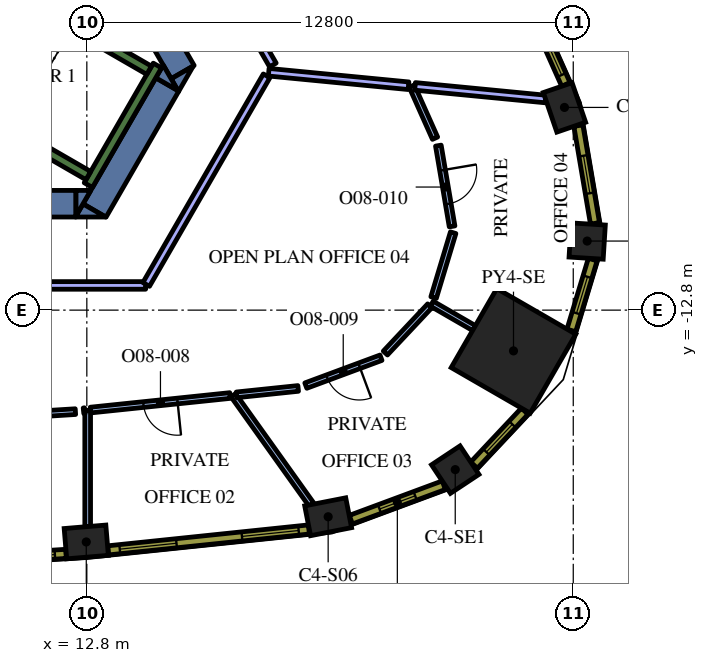
"""IFC4 building model, lengths in metres.
Left out: names, types, materials, properties, quantities, classifications, styles, units other than length and angle.
Written with IfcOpenShell. Run it as: python <this file> out.ifc"""

import sys

from ifc_helpers import new_model, si_unit, direction, frame, frame_2d, origin, origin_2d, place, context, subcontext, project, spatial, polyline, rectangle, outline, extrude, element, fill, save


model = new_model("IFC4")
c1 = context("Model", 3, precision=1e-05, world=origin(), true_north=direction((0.0, 1.0)))
c2 = subcontext(c1, "Body", "Model", "MODEL_VIEW")
j1 = project(units=[si_unit("LENGTHUNIT", "METRE"), si_unit("PLANEANGLEUNIT", "RADIAN")], contexts=[c1])
p1 = place(None, origin())
s1 = spatial("IfcSite", under=j1, at=p1, CompositionType="ELEMENT")
p2 = place(p1, origin())
s2 = spatial("IfcBuilding", under=s1, at=p2, CompositionType="ELEMENT")
p3 = place(p2, frame((0.0, 0.0, 235.2)))
s3 = spatial("IfcBuildingStorey", under=s2, at=p3, CompositionType="ELEMENT", Elevation=235.2)
p4 = place(p3, frame((24.027, -13.872, 0.0), z_axis=(0.0, 0.0, 1.0), x_axis=(0.866025403784, -0.5, 0.0)))
e1 = element("IfcColumn", 1, at=p4, inside=s3, PredefinedType="COLUMN", context=c2, shape_type="SweptSolid", body=[
    extrude(rectangle(XDim=2.4, YDim=2.4, at=origin_2d()), origin(), (0.0, 0.0, 1.0), 4.2),
])
for number, where, z_axis, x_axis in (
    (2, (12.785, -18.9, 0.0), (0.0, 0.0, 1.0), (0.997, 0.083, 0.0)),
    (3, (19.15, -18.237, 0.0), (0.0, 0.0, 1.0), (0.981, 0.192, 0.0)),
):
    element("IfcColumn", number, at=place(p3, frame(where, z_axis=z_axis, x_axis=x_axis)), inside=s3, PredefinedType="COLUMN", context=c2, shape_type="SweptSolid", body=[
        extrude(rectangle(XDim=1.1, YDim=0.8, at=origin_2d()), origin(), (0.0, 0.0, 1.0), 4.2),
    ])
for number, where, z_axis, x_axis in (
    (4, (22.494, -16.997, 0.0), (0.0, 0.0, 1.0), (0.833, 0.553, 0.0)),
    (5, (25.967, -10.982, 0.0), (0.0, 0.0, 1.0), (0.062, 0.998, 0.0)),
):
    element("IfcColumn", number, at=place(p3, frame(where, z_axis=z_axis, x_axis=x_axis)), inside=s3, PredefinedType="COLUMN", context=c2, shape_type="SweptSolid", body=[
        extrude(rectangle(XDim=0.9, YDim=0.9, at=origin_2d()), origin(), (0.0, 0.0, 1.0), 4.2),
    ])
p5 = place(p3, frame((25.369, -7.466, 0.0), z_axis=(0.0, 0.0, 1.0), x_axis=(-0.324074280638, 0.946031638281, 0.0)))
e6 = element("IfcColumn", 6, at=p5, inside=s3, PredefinedType="COLUMN", context=c2, shape_type="SweptSolid", body=[
    extrude(rectangle(XDim=1.1, YDim=0.8, at=origin_2d()), origin(), (0.0, 0.0, 1.0), 4.2),
])
p6 = place(p3, frame((9.085, 4.264, 0.0), z_axis=(0.0, 0.0, 1.0), x_axis=(0.499998082512, -0.866026510844, 0.0)))
e7 = element("IfcWall", 7, at=p6, inside=s3, PredefinedType="SOLIDWALL", context=c2, shape_type="SweptSolid", body=[
    extrude(rectangle(XDim=12.472, YDim=0.7, at=frame_2d((6.236, 0.0))), origin(), (0.0, 0.0, 1.0), 4.2),
])
p7 = place(p3, origin())
e8 = element("IfcWall", 8, at=p7, inside=s3, PredefinedType="SOLIDWALL", context=c2, shape_type="SweptSolid", body=[
    extrude(outline(polyline([(15.213, -7.05), (15.019, -6.714), (15.601, -6.378), (15.213, -7.05)])), origin(), (0.0, 0.0, 1.0), 4.2),
])
p8 = place(p3, frame((13.003, -10.179, 0.0), z_axis=(0.0, 0.0, 1.0), x_axis=(0.499972675833, 0.866041178825, 0.0)))
e9 = element("IfcWall", 9, at=p8, inside=s3, PredefinedType="SOLIDWALL", context=c2, shape_type="SweptSolid", body=[
    extrude(rectangle(XDim=3.829, YDim=0.7, at=frame_2d((1.915, 0.0))), origin(), (0.0, 0.0, 1.0), 4.2),
])
e10 = element("IfcWall", 10, at=p7, inside=s3, PredefinedType="SOLIDWALL", context=c2, shape_type="SweptSolid", body=[
    extrude(outline(polyline([(12.5, -10.35), (12.698, -10.005), (13.296, -10.35), (12.5, -10.35)])), origin(), (0.0, 0.0, 1.0), 4.2),
])
e11 = element("IfcWall", 11, at=p7, inside=s3, PredefinedType="SOLIDWALL", context=c2, shape_type="SweptSolid", body=[
    extrude(outline(polyline([(14.809, -6.35), (15.197, -7.022), (14.615, -6.686), (14.809, -6.35)])), origin(), (0.0, 0.0, 1.0), 4.2),
])
p9 = place(p3, frame((10.604, -10.0, 0.0), z_axis=(0.0, 0.0, 1.0), x_axis=(1.0, 0.0, 0.0)))
e12 = element("IfcWall", 12, at=p9, inside=s3, PredefinedType="SOLIDWALL", context=c2, shape_type="SweptSolid", body=[
    extrude(rectangle(XDim=1.909, YDim=0.7, at=frame_2d((0.955, 0.0))), origin(), (0.0, 0.0, 1.0), 4.2),
])
e13 = element("IfcWall", 13, at=p7, inside=s3, PredefinedType="SOLIDWALL", context=c2, shape_type="SweptSolid", body=[
    extrude(outline(polyline([(12.904, -9.65), (12.516, -10.322), (12.516, -9.65), (12.904, -9.65)])), origin(), (0.0, 0.0, 1.0), 4.2),
])
p10 = place(p3, frame((12.84, -9.511, 0.0), z_axis=(0.0, 0.0, 1.0), x_axis=(0.500048121057, 0.865997619297, 0.0)))
e14 = element("IfcWall", 14, at=p10, inside=s3, PredefinedType="SOLIDWALL", context=c2, shape_type="SweptSolid", body=[
    extrude(rectangle(XDim=3.634, YDim=0.25, at=frame_2d((1.817, 0.0))), origin(), (0.0, 0.0, 1.0), 4.2),
])
p11 = place(p3, frame((12.84, -9.261, 0.0), z_axis=(0.0, 0.0, 1.0), x_axis=(-0.866013990052, 0.500019768644, 0.0)))
e15 = element("IfcWall", 15, at=p11, inside=s3, PredefinedType="SOLIDWALL", context=c2, shape_type="SweptSolid", body=[
    extrude(rectangle(XDim=6.8, YDim=0.25, at=frame_2d((3.4, 0.0))), origin(), (0.0, 0.0, 1.0), 4.2),
])
p12 = place(p3, frame((8.334, -2.964, 0.0), z_axis=(0.0, 0.0, 1.0), x_axis=(0.866016039709, -0.500016218704, 0.0)))
e16 = element("IfcWall", 16, at=p12, inside=s3, PredefinedType="SOLIDWALL", context=c2, shape_type="SweptSolid", body=[
    extrude(rectangle(XDim=7.05, YDim=0.25, at=frame_2d((3.525, 0.0))), origin(), (0.0, 0.0, 1.0), 4.2),
])
p13 = place(p3, frame((12.823, -15.437, 0.0), z_axis=(0.0, 0.0, 1.0), x_axis=(0.0, -1.0, 0.0)))
e17 = element("IfcWall", 17, at=p13, inside=s3, PredefinedType="PARTITIONING", context=c2, shape_type="SweptSolid", body=[
    extrude(rectangle(XDim=3.058, YDim=0.15, at=frame_2d((1.529, 0.0))), origin(), (0.0, 0.0, 1.0), 3.45),
])
p14 = place(p3, frame((12.5, -15.471, 0.0), z_axis=(0.0, 0.0, 1.0), x_axis=(-0.998061916726, -0.0622286942, 0.0)))
e18 = element("IfcWall", 18, at=p14, inside=s3, PredefinedType="PARTITIONING", context=c2, shape_type="SweptSolid", body=[
    extrude(rectangle(XDim=5.995, YDim=0.15, at=frame_2d((2.998, 0.0))), origin(), (0.0, 0.0, 1.0), 3.45),
])
p15 = place(p14, frame((2.595, 0.0, 0.0)))
e19 = element("IfcOpeningElement", 19, at=p15, cuts=e18, PredefinedType="OPENING", context=c2, shape_type="SweptSolid", body=[
    extrude(rectangle(XDim=0.9, YDim=2.1, at=frame_2d((0.45, 1.05))), frame((0.0, 0.085, 0.0), z_axis=(0.0, -1.0, 0.0), x_axis=(1.0, 0.0, 0.0)), (0.0, 0.0, 1.0), 0.17),
])
p16 = place(p3, frame((12.713, -15.448, 0.0), z_axis=(0.0, 0.0, 1.0), x_axis=(0.995106821048, 0.098804932586, 0.0)))
e20 = element("IfcWall", 20, at=p16, inside=s3, PredefinedType="PARTITIONING", context=c2, shape_type="SweptSolid", body=[
    extrude(rectangle(XDim=0.035, YDim=0.15, at=frame_2d((0.017, 0.0))), origin(), (0.0, 0.0, 1.0), 3.45),
])
p17 = place(p3, frame((16.655, -15.038, 0.0), z_axis=(0.0, 0.0, 1.0), x_axis=(0.580996489012, -0.813906063226, 0.0)))
e21 = element("IfcWall", 21, at=p17, inside=s3, PredefinedType="PARTITIONING", context=c2, shape_type="SweptSolid", body=[
    extrude(rectangle(XDim=3.536, YDim=0.15, at=frame_2d((1.768, 0.0))), origin(), (0.0, 0.0, 1.0), 3.45),
])
p18 = place(p3, frame((16.569, -15.047, 0.0), z_axis=(0.0, 0.0, 1.0), x_axis=(-0.994621532294, -0.103576095197, 0.0)))
e22 = element("IfcWall", 22, at=p18, inside=s3, PredefinedType="PARTITIONING", context=c2, shape_type="SweptSolid", body=[
    extrude(rectangle(XDim=3.691, YDim=0.15, at=frame_2d((1.846, 0.0))), origin(), (0.0, 0.0, 1.0), 3.45),
])
p19 = place(p18, frame((1.391, 0.0, 0.0)))
e23 = element("IfcOpeningElement", 23, at=p19, cuts=e22, PredefinedType="OPENING", context=c2, shape_type="SweptSolid", body=[
    extrude(rectangle(XDim=0.9, YDim=2.1, at=frame_2d((0.45, 1.05))), frame((0.0, 0.085, 0.0), z_axis=(0.0, -1.0, 0.0), x_axis=(1.0, 0.0, 0.0)), (0.0, 0.0, 1.0), 0.17),
])
p20 = place(p3, frame((21.877, -12.63, 0.0), z_axis=(0.0, 0.0, 1.0), x_axis=(0.86599869919, -0.500046250861, 0.0)))
e24 = element("IfcWall", 24, at=p20, inside=s3, PredefinedType="PARTITIONING", context=c2, shape_type="SweptSolid", body=[
    extrude(rectangle(XDim=1.284, YDim=0.15, at=frame_2d((0.642, 0.0))), origin(), (0.0, 0.0, 1.0), 3.45),
])
p21 = place(p3, frame((16.74, -15.029, 0.0), z_axis=(0.0, 0.0, 1.0), x_axis=(0.994614871477, 0.103640037805, 0.0)))
e25 = element("IfcWall", 25, at=p21, inside=s3, PredefinedType="PARTITIONING", context=c2, shape_type="SweptSolid", body=[
    extrude(rectangle(XDim=1.63, YDim=0.15, at=frame_2d((0.815, 0.0))), origin(), (0.0, 0.0, 1.0), 3.45),
])
p22 = place(p3, frame((20.541, -14.052, 0.0), z_axis=(0.0, 0.0, 1.0), x_axis=(-0.937602119917, -0.347710029662, 0.0)))
e26 = element("IfcWall", 26, at=p22, inside=s3, PredefinedType="PARTITIONING", context=c2, shape_type="SweptSolid", body=[
    extrude(rectangle(XDim=2.11, YDim=0.15, at=frame_2d((1.055, 0.0))), origin(), (0.0, 0.0, 1.0), 3.45),
])
p23 = place(p22, frame((0.61, 0.0, 0.0)))
e27 = element("IfcOpeningElement", 27, at=p23, cuts=e26, PredefinedType="OPENING", context=c2, shape_type="SweptSolid", body=[
    extrude(rectangle(XDim=0.9, YDim=2.1, at=frame_2d((0.45, 1.05))), frame((0.0, 0.085, 0.0), z_axis=(0.0, -1.0, 0.0), x_axis=(1.0, 0.0, 0.0)), (0.0, 0.0, 1.0), 0.17),
])
p24 = place(p3, frame((20.656, -13.929, 0.0), z_axis=(0.0, 0.0, 1.0), x_axis=(0.684716940988, 0.728809104447, 0.0)))
e28 = element("IfcWall", 28, at=p24, inside=s3, PredefinedType="PARTITIONING", context=c2, shape_type="SweptSolid", body=[
    extrude(rectangle(XDim=1.705, YDim=0.15, at=frame_2d((0.853, 0.0))), origin(), (0.0, 0.0, 1.0), 3.45),
])
p25 = place(p3, frame((21.925, -12.469, 0.0), z_axis=(0.0, 0.0, 1.0), x_axis=(0.288767705809, 0.957399191603, 0.0)))
e29 = element("IfcWall", 29, at=p25, inside=s3, PredefinedType="PARTITIONING", context=c2, shape_type="SweptSolid", body=[
    extrude(rectangle(XDim=1.782, YDim=0.15, at=frame_2d((0.891, 0.0))), origin(), (0.0, 0.0, 1.0), 3.45),
])
p26 = place(p3, frame((22.05, -8.471, 0.0), z_axis=(0.0, 0.0, 1.0), x_axis=(0.167612004459, -0.985853039738, 0.0)))
e30 = element("IfcWall", 30, at=p26, inside=s3, PredefinedType="PARTITIONING", context=c2, shape_type="SweptSolid", body=[
    extrude(rectangle(XDim=2.156, YDim=0.15, at=frame_2d((1.078, 0.0))), origin(), (0.0, 0.0, 1.0), 3.45),
])
p27 = place(p26, frame((0.656, 0.0, 0.0)))
e31 = element("IfcOpeningElement", 31, at=p27, cuts=e30, PredefinedType="OPENING", context=c2, shape_type="SweptSolid", body=[
    extrude(rectangle(XDim=0.9, YDim=2.1, at=frame_2d((0.45, 1.05))), frame((0.0, 0.085, 0.0), z_axis=(0.0, -1.0, 0.0), x_axis=(1.0, 0.0, 0.0)), (0.0, 0.0, 1.0), 0.17),
])
p28 = place(p3, frame((21.963, -8.276, 0.0), z_axis=(0.0, 0.0, 1.0), x_axis=(-0.407510458183, 0.913200540118, 0.0)))
e32 = element("IfcWall", 32, at=p28, inside=s3, PredefinedType="PARTITIONING", context=c2, shape_type="SweptSolid", body=[
    extrude(rectangle(XDim=1.502, YDim=0.15, at=frame_2d((0.751, 0.0))), origin(), (0.0, 0.0, 1.0), 3.45),
])
p29 = place(p3, frame((21.437, -6.913, 0.0), z_axis=(0.0, 0.0, 1.0), x_axis=(0.995357015301, -0.096251816042, 0.0)))
e33 = element("IfcWall", 33, at=p29, inside=s3, PredefinedType="PARTITIONING", context=c2, shape_type="SweptSolid", body=[
    extrude(rectangle(XDim=3.45, YDim=0.2, at=frame_2d((1.725, 0.0))), origin(), (0.0, 0.0, 1.0), 3.45),
])
p30 = place(p3, frame((17.586, -6.54, 0.0), z_axis=(0.0, 0.0, 1.0), x_axis=(0.995358181524, -0.096239755158, 0.0)))
e34 = element("IfcWall", 34, at=p30, inside=s3, PredefinedType="PARTITIONING", context=c2, shape_type="SweptSolid", body=[
    extrude(rectangle(XDim=3.696, YDim=0.2, at=frame_2d((1.848, 0.0))), origin(), (0.0, 0.0, 1.0), 3.45),
])
p31 = place(p3, frame((6.517, -12.15, 0.0), z_axis=(0.0, 0.0, 1.0), x_axis=(1.0, 0.0, 0.0)))
e35 = element("IfcWall", 35, at=p31, inside=s3, PredefinedType="PARTITIONING", context=c2, shape_type="SweptSolid", body=[
    extrude(rectangle(XDim=7.83, YDim=0.2, at=frame_2d((3.915, 0.0))), origin(), (0.0, 0.0, 1.0), 3.45),
])
p32 = place(p31, frame((3.4, 0.0, 0.0)))
e36 = element("IfcOpeningElement", 36, at=p32, cuts=e35, PredefinedType="OPENING", context=c2, shape_type="SweptSolid", body=[
    extrude(rectangle(XDim=1.0, YDim=2.1, at=frame_2d((0.5, 1.05))), frame((0.0, 0.11, 0.0), z_axis=(0.0, -1.0, 0.0), x_axis=(1.0, 0.0, 0.0)), (0.0, 0.0, 1.0), 0.22),
])
p33 = place(p3, frame((14.362, -12.124, 0.0), z_axis=(0.0, 0.0, 1.0), x_axis=(0.500017005442, 0.866015585465, 0.0)))
e37 = element("IfcWall", 37, at=p33, inside=s3, PredefinedType="PARTITIONING", context=c2, shape_type="SweptSolid", body=[
    extrude(rectangle(XDim=6.338, YDim=0.2, at=frame_2d((3.169, 0.0))), origin(), (0.0, 0.0, 1.0), 3.45),
])
p34 = place(p3, frame((17.696, -6.35, 0.0), z_axis=(0.0, 0.0, 1.0), x_axis=(-0.499976825411, 0.866038783226, 0.0)))
e38 = element("IfcWall", 38, at=p34, inside=s3, PredefinedType="PARTITIONING", context=c2, shape_type="SweptSolid", body=[
    extrude(rectangle(XDim=4.653, YDim=0.2, at=frame_2d((2.326, 0.0))), origin(), (0.0, 0.0, 1.0), 3.45),
])
p35 = place(p3, frame((6.965, -19.543, 0.0), z_axis=(0.0, 0.0, 1.0), x_axis=(0.9980633213, 0.062206162685, 0.0)))
e39 = element("IfcWall", 39, at=p35, inside=s3, PredefinedType="SOLIDWALL", context=c2, shape_type="SweptSolid", body=[
    extrude(rectangle(XDim=5.298, YDim=0.24, at=frame_2d((2.649, 0.0))), origin(), (0.0, 0.0, 1.0), 3.95),
])
p36 = place(p35, frame((0.295, 0.0, 0.9)))
e40 = element("IfcOpeningElement", 40, at=p36, cuts=e39, PredefinedType="OPENING", context=c2, shape_type="SweptSolid", body=[
    extrude(rectangle(XDim=1.5, YDim=2.55, at=frame_2d((0.75, 1.275))), frame((0.0, 0.13, 0.0), z_axis=(0.0, -1.0, 0.0), x_axis=(1.0, 0.0, 0.0)), (0.0, 0.0, 1.0), 0.26),
])
p37 = place(p35, frame((3.504, 0.0, 0.9)))
e41 = element("IfcOpeningElement", 41, at=p37, cuts=e39, PredefinedType="OPENING", context=c2, shape_type="SweptSolid", body=[
    extrude(rectangle(XDim=1.5, YDim=2.55, at=frame_2d((0.75, 1.275))), frame((0.0, 0.13, 0.0), z_axis=(0.0, -1.0, 0.0), x_axis=(1.0, 0.0, 0.0)), (0.0, 0.0, 1.0), 0.26),
])
p38 = place(p3, frame((13.362, -19.121, 0.0), z_axis=(0.0, 0.0, 1.0), x_axis=(0.994621961215, 0.103571976272, 0.0)))
e42 = element("IfcWall", 42, at=p38, inside=s3, PredefinedType="SOLIDWALL", context=c2, shape_type="SweptSolid", body=[
    extrude(rectangle(XDim=5.311, YDim=0.24, at=frame_2d((2.655, 0.0))), origin(), (0.0, 0.0, 1.0), 3.95),
])
p39 = place(p38, frame((0.306, 0.0, 0.9)))
e43 = element("IfcOpeningElement", 43, at=p39, cuts=e42, PredefinedType="OPENING", context=c2, shape_type="SweptSolid", body=[
    extrude(rectangle(XDim=1.5, YDim=2.55, at=frame_2d((0.75, 1.275))), frame((0.0, 0.13, 0.0), z_axis=(0.0, -1.0, 0.0), x_axis=(1.0, 0.0, 0.0)), (0.0, 0.0, 1.0), 0.26),
])
p40 = place(p38, frame((3.539, 0.0, 0.9)))
e44 = element("IfcOpeningElement", 44, at=p40, cuts=e42, PredefinedType="OPENING", context=c2, shape_type="SweptSolid", body=[
    extrude(rectangle(XDim=1.5, YDim=2.55, at=frame_2d((0.75, 1.275))), frame((0.0, 0.13, 0.0), z_axis=(0.0, -1.0, 0.0), x_axis=(1.0, 0.0, 0.0)), (0.0, 0.0, 1.0), 0.26),
])
p41 = place(p3, frame((19.748, -18.314, 0.0), z_axis=(0.0, 0.0, 1.0), x_axis=(0.937569171184, 0.347798863203, 0.0)))
e45 = element("IfcWall", 45, at=p41, inside=s3, PredefinedType="SOLIDWALL", context=c2, shape_type="SweptSolid", body=[
    extrude(rectangle(XDim=2.609, YDim=0.24, at=frame_2d((1.305, 0.0))), origin(), (0.0, 0.0, 1.0), 3.95),
])
p42 = place(p41, frame((0.805, 0.0, 0.9)))
e46 = element("IfcOpeningElement", 46, at=p42, cuts=e45, PredefinedType="OPENING", context=c2, shape_type="SweptSolid", body=[
    extrude(rectangle(XDim=1.0, YDim=2.55, at=frame_2d((0.5, 1.275))), frame((0.0, 0.13, 0.0), z_axis=(0.0, -1.0, 0.0), x_axis=(1.0, 0.0, 0.0)), (0.0, 0.0, 1.0), 0.26),
])
p43 = place(p3, frame((22.989, -16.879, 0.0), z_axis=(0.0, 0.0, 1.0), x_axis=(0.684770274166, 0.728758994194, 0.0)))
e47 = element("IfcWall", 47, at=p43, inside=s3, PredefinedType="SOLIDWALL", context=c2, shape_type="SweptSolid", body=[
    extrude(rectangle(XDim=1.948, YDim=0.24, at=frame_2d((0.974, 0.0))), origin(), (0.0, 0.0, 1.0), 3.95),
])
p44 = place(p43, frame((0.474, 0.0, 0.9)))
e48 = element("IfcOpeningElement", 48, at=p44, cuts=e47, PredefinedType="OPENING", context=c2, shape_type="SweptSolid", body=[
    extrude(rectangle(XDim=1.0, YDim=2.55, at=frame_2d((0.5, 1.275))), frame((0.0, 0.13, 0.0), z_axis=(0.0, -1.0, 0.0), x_axis=(1.0, 0.0, 0.0)), (0.0, 0.0, 1.0), 0.26),
])
p45 = place(p3, frame((25.55, -13.335, 0.0), z_axis=(0.0, 0.0, 1.0), x_axis=(0.288727209095, 0.957411405159, 0.0)))
e49 = element("IfcWall", 49, at=p45, inside=s3, PredefinedType="SOLIDWALL", context=c2, shape_type="SweptSolid", body=[
    extrude(rectangle(XDim=1.948, YDim=0.24, at=frame_2d((0.974, 0.0))), origin(), (0.0, 0.0, 1.0), 3.95),
])
p46 = place(p45, frame((0.474, 0.0, 0.9)))
e50 = element("IfcOpeningElement", 50, at=p46, cuts=e49, PredefinedType="OPENING", context=c2, shape_type="SweptSolid", body=[
    extrude(rectangle(XDim=1.0, YDim=2.55, at=frame_2d((0.5, 1.275))), frame((0.0, 0.13, 0.0), z_axis=(0.0, -1.0, 0.0), x_axis=(1.0, 0.0, 0.0)), (0.0, 0.0, 1.0), 0.26),
])
p47 = place(p3, frame((26.172, -10.517, 0.0), z_axis=(0.0, 0.0, 1.0), x_axis=(-0.167660055546, 0.985844869021, 0.0)))
e51 = element("IfcWall", 51, at=p47, inside=s3, PredefinedType="SOLIDWALL", context=c2, shape_type="SweptSolid", body=[
    extrude(rectangle(XDim=2.609, YDim=0.24, at=frame_2d((1.305, 0.0))), origin(), (0.0, 0.0, 1.0), 3.95),
])
p48 = place(p47, frame((0.805, 0.0, 0.9)))
e52 = element("IfcOpeningElement", 52, at=p48, cuts=e51, PredefinedType="OPENING", context=c2, shape_type="SweptSolid", body=[
    extrude(rectangle(XDim=1.0, YDim=2.55, at=frame_2d((0.5, 1.275))), frame((0.0, 0.13, 0.0), z_axis=(0.0, -1.0, 0.0), x_axis=(1.0, 0.0, 0.0)), (0.0, 0.0, 1.0), 0.26),
])
p49 = place(p3, frame((25.405, -6.861, 0.0), z_axis=(0.0, 0.0, 1.0), x_axis=(-0.407579651789, 0.913169659728, 0.0)))
e53 = element("IfcWall", 53, at=p49, inside=s3, PredefinedType="SOLIDWALL", context=c2, shape_type="SweptSolid", body=[
    extrude(rectangle(XDim=5.311, YDim=0.24, at=frame_2d((2.655, 0.0))), origin(), (0.0, 0.0, 1.0), 3.95),
])
p50 = place(p49, frame((0.271, 0.0, 0.9)))
e54 = element("IfcOpeningElement", 54, at=p50, cuts=e53, PredefinedType="OPENING", context=c2, shape_type="SweptSolid", body=[
    extrude(rectangle(XDim=1.5, YDim=2.55, at=frame_2d((0.75, 1.275))), frame((0.0, 0.13, 0.0), z_axis=(0.0, -1.0, 0.0), x_axis=(1.0, 0.0, 0.0)), (0.0, 0.0, 1.0), 0.26),
])
p51 = place(p49, frame((3.504, 0.0, 0.9)))
e55 = element("IfcOpeningElement", 55, at=p51, cuts=e53, PredefinedType="OPENING", context=c2, shape_type="SweptSolid", body=[
    extrude(rectangle(XDim=1.5, YDim=2.55, at=frame_2d((0.75, 1.275))), frame((0.0, 0.13, 0.0), z_axis=(0.0, -1.0, 0.0), x_axis=(1.0, 0.0, 0.0)), (0.0, 0.0, 1.0), 0.26),
])
p52 = place(p19, origin())
e56 = element("IfcDoor", 56, at=p52, inside=s3, OperationType="SINGLE_SWING_LEFT", PredefinedType="DOOR", context=c2, shape_type="SweptSolid", body=[
    extrude(rectangle(XDim=0.9, YDim=2.1, at=frame_2d((0.45, 1.05))), frame((0.0, 0.025, 0.0), z_axis=(0.0, -1.0, 0.0), x_axis=(1.0, 0.0, 0.0)), (0.0, 0.0, 1.0), 0.05),
])
fill(e23, e56)
p53 = place(p23, origin())
e57 = element("IfcDoor", 57, at=p53, inside=s3, OperationType="SINGLE_SWING_RIGHT", PredefinedType="DOOR", context=c2, shape_type="SweptSolid", body=[
    extrude(rectangle(XDim=0.9, YDim=2.1, at=frame_2d((0.45, 1.05))), frame((0.0, 0.025, 0.0), z_axis=(0.0, -1.0, 0.0), x_axis=(1.0, 0.0, 0.0)), (0.0, 0.0, 1.0), 0.05),
])
fill(e27, e57)
p54 = place(p27, origin())
e58 = element("IfcDoor", 58, at=p54, inside=s3, OperationType="SINGLE_SWING_RIGHT", PredefinedType="DOOR", context=c2, shape_type="SweptSolid", body=[
    extrude(rectangle(XDim=0.9, YDim=2.1, at=frame_2d((0.45, 1.05))), frame((0.0, 0.025, 0.0), z_axis=(0.0, -1.0, 0.0), x_axis=(1.0, 0.0, 0.0)), (0.0, 0.0, 1.0), 0.05),
])
fill(e31, e58)
p55 = place(p37, origin())
e59 = element("IfcWindow", 59, at=p55, inside=s3, PartitioningType="SINGLE_PANEL", PredefinedType="WINDOW", context=c2, shape_type="SweptSolid", body=[
    extrude(rectangle(XDim=1.5, YDim=2.55, at=frame_2d((0.75, 1.275))), frame((0.0, 0.04, 0.0), z_axis=(0.0, -1.0, 0.0), x_axis=(1.0, 0.0, 0.0)), (0.0, 0.0, 1.0), 0.06),
])
fill(e41, e59)
p56 = place(p39, origin())
e60 = element("IfcWindow", 60, at=p56, inside=s3, PartitioningType="SINGLE_PANEL", PredefinedType="WINDOW", context=c2, shape_type="SweptSolid", body=[
    extrude(rectangle(XDim=1.5, YDim=2.55, at=frame_2d((0.75, 1.275))), frame((0.0, 0.04, 0.0), z_axis=(0.0, -1.0, 0.0), x_axis=(1.0, 0.0, 0.0)), (0.0, 0.0, 1.0), 0.06),
])
fill(e43, e60)
p57 = place(p40, origin())
e61 = element("IfcWindow", 61, at=p57, inside=s3, PartitioningType="SINGLE_PANEL", PredefinedType="WINDOW", context=c2, shape_type="SweptSolid", body=[
    extrude(rectangle(XDim=1.5, YDim=2.55, at=frame_2d((0.75, 1.275))), frame((0.0, 0.04, 0.0), z_axis=(0.0, -1.0, 0.0), x_axis=(1.0, 0.0, 0.0)), (0.0, 0.0, 1.0), 0.06),
])
fill(e44, e61)
p58 = place(p42, origin())
e62 = element("IfcWindow", 62, at=p58, inside=s3, PartitioningType="SINGLE_PANEL", PredefinedType="WINDOW", context=c2, shape_type="SweptSolid", body=[
    extrude(rectangle(XDim=1.0, YDim=2.55, at=frame_2d((0.5, 1.275))), frame((0.0, 0.04, 0.0), z_axis=(0.0, -1.0, 0.0), x_axis=(1.0, 0.0, 0.0)), (0.0, 0.0, 1.0), 0.06),
])
fill(e46, e62)
p59 = place(p44, origin())
e63 = element("IfcWindow", 63, at=p59, inside=s3, PartitioningType="SINGLE_PANEL", PredefinedType="WINDOW", context=c2, shape_type="SweptSolid", body=[
    extrude(rectangle(XDim=1.0, YDim=2.55, at=frame_2d((0.5, 1.275))), frame((0.0, 0.04, 0.0), z_axis=(0.0, -1.0, 0.0), x_axis=(1.0, 0.0, 0.0)), (0.0, 0.0, 1.0), 0.06),
])
fill(e48, e63)
p60 = place(p46, origin())
e64 = element("IfcWindow", 64, at=p60, inside=s3, PartitioningType="SINGLE_PANEL", PredefinedType="WINDOW", context=c2, shape_type="SweptSolid", body=[
    extrude(rectangle(XDim=1.0, YDim=2.55, at=frame_2d((0.5, 1.275))), frame((0.0, 0.04, 0.0), z_axis=(0.0, -1.0, 0.0), x_axis=(1.0, 0.0, 0.0)), (0.0, 0.0, 1.0), 0.06),
])
fill(e50, e64)
p61 = place(p48, origin())
e65 = element("IfcWindow", 65, at=p61, inside=s3, PartitioningType="SINGLE_PANEL", PredefinedType="WINDOW", context=c2, shape_type="SweptSolid", body=[
    extrude(rectangle(XDim=1.0, YDim=2.55, at=frame_2d((0.5, 1.275))), frame((0.0, 0.04, 0.0), z_axis=(0.0, -1.0, 0.0), x_axis=(1.0, 0.0, 0.0)), (0.0, 0.0, 1.0), 0.06),
])
fill(e52, e65)
p62 = place(p50, origin())
e66 = element("IfcWindow", 66, at=p62, inside=s3, PartitioningType="SINGLE_PANEL", PredefinedType="WINDOW", context=c2, shape_type="SweptSolid", body=[
    extrude(rectangle(XDim=1.5, YDim=2.55, at=frame_2d((0.75, 1.275))), frame((0.0, 0.04, 0.0), z_axis=(0.0, -1.0, 0.0), x_axis=(1.0, 0.0, 0.0)), (0.0, 0.0, 1.0), 0.06),
])
fill(e54, e66)
save(model, sys.argv[1])
